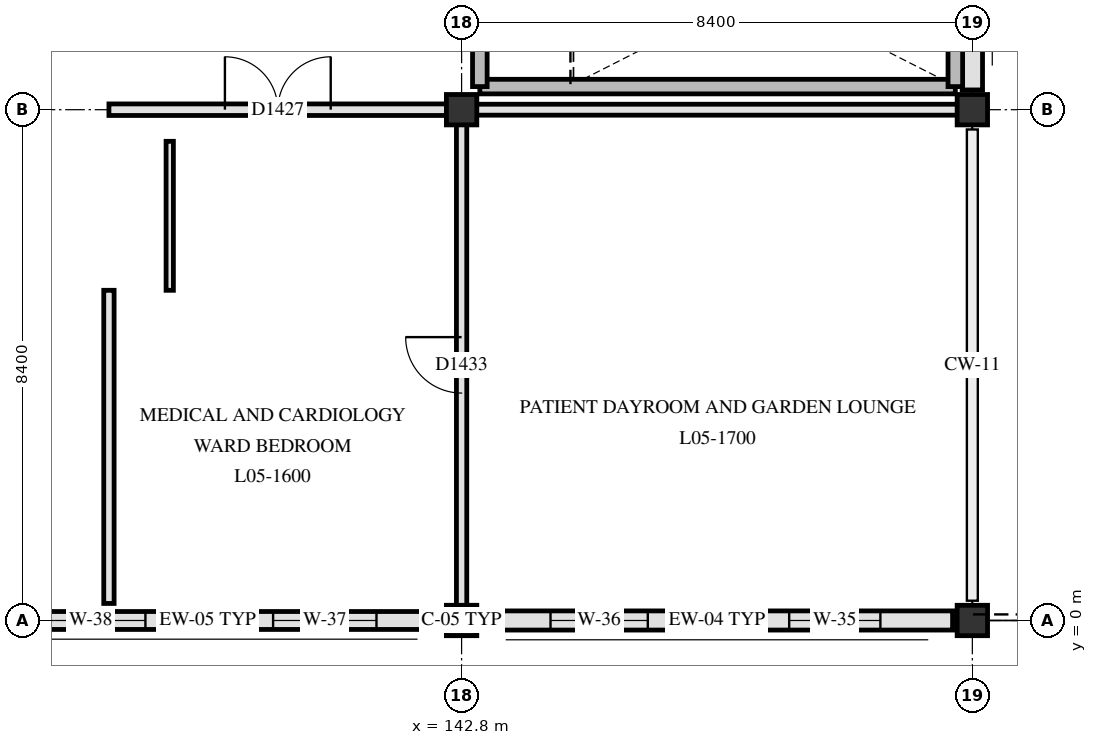
"""IFC4 building model, lengths in metres.
Left out: names, types, materials, properties, quantities, classifications, styles, units other than length and angle.
Written with IfcOpenShell. Run it as: python <this file> out.ifc"""

import sys

from ifc_helpers import new_model, si_unit, direction, frame, frame_2d, origin, origin_2d, place, context, subcontext, project, spatial, rectangle, extrude, element, fill, save


model = new_model("IFC4")
c1 = context("Model", 3, precision=1e-05, world=origin(), true_north=direction((0.0, 1.0)))
c2 = subcontext(c1, "Body", "Model", "MODEL_VIEW")
j1 = project(units=[si_unit("LENGTHUNIT", "METRE"), si_unit("PLANEANGLEUNIT", "RADIAN")], contexts=[c1])
p1 = place(None, origin())
s1 = spatial("IfcSite", under=j1, at=p1, CompositionType="ELEMENT")
p2 = place(p1, origin())
s2 = spatial("IfcBuilding", under=s1, at=p2, CompositionType="ELEMENT")
p3 = place(p2, frame((0.0, 0.0, 22.5)))
s3 = spatial("IfcBuildingStorey", under=s2, at=p3, CompositionType="ELEMENT", Elevation=22.5)
for number, where, z_axis, x_axis in (
    (1, (142.8, 0.0, 0.0), (0.0, 0.0, 1.0), (1.0, 0.0, 0.0)),
    (2, (142.8, 8.4, 0.0), (0.0, 0.0, 1.0), (1.0, 0.0, 0.0)),
    (3, (151.2, 0.0, 0.0), (0.0, 0.0, 1.0), (1.0, 0.0, 0.0)),
    (4, (151.2, 8.4, 0.0), (0.0, 0.0, 1.0), (1.0, 0.0, 0.0)),
):
    element("IfcColumn", number, at=place(p3, frame(where, z_axis=z_axis, x_axis=x_axis)), inside=s3, PredefinedType="COLUMN", context=c2, shape_type="SweptSolid", body=[
        extrude(rectangle(XDim=0.5, YDim=0.5, at=origin_2d()), origin(), (0.0, 0.0, 1.0), 3.9),
    ])
p4 = place(p3, frame((151.2, 16.475, 0.0), z_axis=(0.0, 0.0, 1.0), x_axis=(0.0, -1.0, 0.0)))
e5 = element("IfcWall", 5, at=p4, inside=s3, PredefinedType="SOLIDWALL", context=c2, shape_type="SweptSolid", body=[
    extrude(rectangle(XDim=7.75, YDim=0.335, at=frame_2d((3.875, 0.0))), origin(), (0.0, 0.0, 1.0), 3.37),
])
p5 = place(p4, frame((1.288, 0.0, 0.85)))
e6 = element("IfcOpeningElement", 6, at=p5, cuts=e5, PredefinedType="OPENING", context=c2, shape_type="SweptSolid", body=[
    extrude(rectangle(XDim=1.3, YDim=1.66, at=frame_2d((0.65, 0.83))), frame((0.0, 0.177, 0.0), z_axis=(0.0, -1.0, 0.0), x_axis=(1.0, 0.0, 0.0)), (0.0, 0.0, 1.0), 0.355),
])
p6 = place(p4, frame((5.113, 0.0, 0.85)))
e7 = element("IfcOpeningElement", 7, at=p6, cuts=e5, PredefinedType="OPENING", context=c2, shape_type="SweptSolid", body=[
    extrude(rectangle(XDim=1.4, YDim=1.66, at=frame_2d((0.7, 0.83))), frame((0.0, 0.177, 0.0), z_axis=(0.0, -1.0, 0.0), x_axis=(1.0, 0.0, 0.0)), (0.0, 0.0, 1.0), 0.355),
])
p7 = place(p3, frame((150.875, 0.0, 0.0), z_axis=(0.0, 0.0, 1.0), x_axis=(-1.0, 0.0, 0.0)))
e8 = element("IfcWall", 8, at=p7, inside=s3, PredefinedType="SOLIDWALL", context=c2, shape_type="SweptSolid", body=[
    extrude(rectangle(XDim=7.75, YDim=0.315, at=frame_2d((3.875, 0.0))), origin(), (0.0, 0.0, 1.0), 3.3),
])
p8 = place(p7, frame((1.188, 0.0, 0.85)))
e9 = element("IfcOpeningElement", 9, at=p8, cuts=e8, PredefinedType="OPENING", context=c2, shape_type="SweptSolid", body=[
    extrude(rectangle(XDim=1.5, YDim=1.66, at=frame_2d((0.75, 0.83))), frame((0.0, 0.167, 0.0), z_axis=(0.0, -1.0, 0.0), x_axis=(1.0, 0.0, 0.0)), (0.0, 0.0, 1.0), 0.335),
])
p9 = place(p7, frame((5.012, 0.0, 0.85)))
e10 = element("IfcOpeningElement", 10, at=p9, cuts=e8, PredefinedType="OPENING", context=c2, shape_type="SweptSolid", body=[
    extrude(rectangle(XDim=1.6, YDim=1.66, at=frame_2d((0.8, 0.83))), frame((0.0, 0.167, 0.0), z_axis=(0.0, -1.0, 0.0), x_axis=(1.0, 0.0, 0.0)), (0.0, 0.0, 1.0), 0.335),
])
p10 = place(p3, frame((142.475, 0.0, 0.0), z_axis=(0.0, 0.0, 1.0), x_axis=(-1.0, 0.0, 0.0)))
e11 = element("IfcWall", 11, at=p10, inside=s3, PredefinedType="SOLIDWALL", context=c2, shape_type="SweptSolid", body=[
    extrude(rectangle(XDim=7.7, YDim=0.295, at=frame_2d((3.85, 0.0))), origin(), (0.0, 0.0, 1.0), 3.31),
])
p11 = place(p10, frame((1.075, 0.0, 0.85)))
e12 = element("IfcOpeningElement", 12, at=p11, cuts=e11, PredefinedType="OPENING", context=c2, shape_type="SweptSolid", body=[
    extrude(rectangle(XDim=1.7, YDim=1.66, at=frame_2d((0.85, 0.83))), frame((0.0, 0.157, 0.0), z_axis=(0.0, -1.0, 0.0), x_axis=(1.0, 0.0, 0.0)), (0.0, 0.0, 1.0), 0.315),
])
p12 = place(p10, frame((4.875, 0.0, 0.85)))
e13 = element("IfcOpeningElement", 13, at=p12, cuts=e11, PredefinedType="OPENING", context=c2, shape_type="SweptSolid", body=[
    extrude(rectangle(XDim=1.8, YDim=1.66, at=frame_2d((0.9, 0.83))), frame((0.0, 0.157, 0.0), z_axis=(0.0, -1.0, 0.0), x_axis=(1.0, 0.0, 0.0)), (0.0, 0.0, 1.0), 0.315),
])
p13 = place(p3, frame((143.1, 8.78, 0.0), z_axis=(0.0, 0.0, 1.0), x_axis=(1.0, 0.0, 0.0)))
e14 = element("IfcWall", 14, at=p13, inside=s3, PredefinedType="SHEAR", context=c2, shape_type="SweptSolid", body=[
    extrude(rectangle(XDim=7.82, YDim=0.24, at=frame_2d((3.91, 0.0))), origin(), (0.0, 0.0, 1.0), 3.62),
])
for number, where, z_axis, x_axis in (
    (15, (143.1, 8.78, 0.0), (0.0, 0.0, 1.0), (0.0, 1.0, 0.0)),
    (16, (150.92, 8.78, 0.0), (0.0, 0.0, 1.0), (0.0, 1.0, 0.0)),
):
    element("IfcWall", number, at=place(p3, frame(where, z_axis=z_axis, x_axis=x_axis)), inside=s3, PredefinedType="SHEAR", context=c2, shape_type="SweptSolid", body=[
        extrude(rectangle(XDim=3.32, YDim=0.24, at=frame_2d((1.66, 0.0))), origin(), (0.0, 0.0, 1.0), 3.62),
    ])
p14 = place(p3, frame((137.0, 8.4, 0.0), z_axis=(0.0, 0.0, 1.0), x_axis=(1.0, 0.0, 0.0)))
e17 = element("IfcWall", 17, at=p14, inside=s3, PredefinedType="PARTITIONING", context=c2, shape_type="SweptSolid", body=[
    extrude(rectangle(XDim=5.555, YDim=0.19, at=frame_2d((2.777, 0.0))), origin(), (0.0, 0.0, 1.0), 3.16),
])
p15 = place(p14, frame((1.907, 0.0, 0.0)))
e18 = element("IfcOpeningElement", 18, at=p15, cuts=e17, PredefinedType="OPENING", context=c2, shape_type="SweptSolid", body=[
    extrude(rectangle(XDim=1.74, YDim=2.24, at=frame_2d((0.87, 1.12))), frame((0.0, 0.105, 0.0), z_axis=(0.0, -1.0, 0.0), x_axis=(1.0, 0.0, 0.0)), (0.0, 0.0, 1.0), 0.21),
])
p16 = place(p3, frame((143.045, 8.4, 0.0), z_axis=(0.0, 0.0, 1.0), x_axis=(1.0, 0.0, 0.0)))
e19 = element("IfcWall", 19, at=p16, inside=s3, PredefinedType="PARTITIONING", context=c2, shape_type="SweptSolid", body=[
    extrude(rectangle(XDim=7.91, YDim=0.18, at=frame_2d((3.955, 0.0))), origin(), (0.0, 0.0, 1.0), 3.15),
])
p17 = place(p3, frame((137.0, 0.28, 0.0), z_axis=(0.0, 0.0, 1.0), x_axis=(0.0, 1.0, 0.0)))
e20 = element("IfcWall", 20, at=p17, inside=s3, PredefinedType="PARTITIONING", context=c2, shape_type="SweptSolid", body=[
    extrude(rectangle(XDim=5.15, YDim=0.17, at=frame_2d((2.575, 0.0))), origin(), (0.0, 0.0, 1.0), 3.34),
])
p18 = place(p3, frame((138.0, 5.43, 0.0), z_axis=(0.0, 0.0, 1.0), x_axis=(0.0, 1.0, 0.0)))
e21 = element("IfcWall", 21, at=p18, inside=s3, PredefinedType="PARTITIONING", context=c2, shape_type="SweptSolid", body=[
    extrude(rectangle(XDim=2.45, YDim=0.12, at=frame_2d((1.225, 0.0))), origin(), (0.0, 0.0, 1.0), 3.34),
])
p19 = place(p3, frame((142.8, 0.245, 0.0), z_axis=(0.0, 0.0, 1.0), x_axis=(0.0, 1.0, 0.0)))
e22 = element("IfcWall", 22, at=p19, inside=s3, PredefinedType="PARTITIONING", context=c2, shape_type="SweptSolid", body=[
    extrude(rectangle(XDim=7.91, YDim=0.17, at=frame_2d((3.955, 0.0))), origin(), (0.0, 0.0, 1.0), 3.29),
])
p20 = place(p19, frame((3.495, 0.0, 0.0)))
e23 = element("IfcOpeningElement", 23, at=p20, cuts=e22, PredefinedType="OPENING", context=c2, shape_type="SweptSolid", body=[
    extrude(rectangle(XDim=0.92, YDim=2.08, at=frame_2d((0.46, 1.04))), frame((0.0, 0.095, 0.0), z_axis=(0.0, -1.0, 0.0), x_axis=(1.0, 0.0, 0.0)), (0.0, 0.0, 1.0), 0.19),
])
p21 = place(p8, origin())
e24 = element("IfcWindow", 24, at=p21, inside=s3, PartitioningType="SINGLE_PANEL", PredefinedType="WINDOW", context=c2, shape_type="SweptSolid", body=[
    extrude(rectangle(XDim=1.5, YDim=1.66, at=frame_2d((0.75, 0.83))), frame((0.0, 0.03, 0.0), z_axis=(0.0, -1.0, 0.0), x_axis=(1.0, 0.0, 0.0)), (0.0, 0.0, 1.0), 0.06),
])
fill(e9, e24)
p22 = place(p9, origin())
e25 = element("IfcWindow", 25, at=p22, inside=s3, PartitioningType="SINGLE_PANEL", PredefinedType="WINDOW", context=c2, shape_type="SweptSolid", body=[
    extrude(rectangle(XDim=1.6, YDim=1.66, at=frame_2d((0.8, 0.83))), frame((0.0, 0.03, 0.0), z_axis=(0.0, -1.0, 0.0), x_axis=(1.0, 0.0, 0.0)), (0.0, 0.0, 1.0), 0.06),
])
fill(e10, e25)
p23 = place(p11, origin())
e26 = element("IfcWindow", 26, at=p23, inside=s3, PartitioningType="SINGLE_PANEL", PredefinedType="WINDOW", context=c2, shape_type="SweptSolid", body=[
    extrude(rectangle(XDim=1.7, YDim=1.66, at=frame_2d((0.85, 0.83))), frame((0.0, 0.03, 0.0), z_axis=(0.0, -1.0, 0.0), x_axis=(1.0, 0.0, 0.0)), (0.0, 0.0, 1.0), 0.06),
])
fill(e12, e26)
p24 = place(p12, origin())
e27 = element("IfcWindow", 27, at=p24, inside=s3, PartitioningType="SINGLE_PANEL", PredefinedType="WINDOW", context=c2, shape_type="SweptSolid", body=[
    extrude(rectangle(XDim=1.8, YDim=1.66, at=frame_2d((0.9, 0.83))), frame((0.0, 0.03, 0.0), z_axis=(0.0, -1.0, 0.0), x_axis=(1.0, 0.0, 0.0)), (0.0, 0.0, 1.0), 0.06),
])
fill(e13, e27)
p25 = place(p15, origin())
e28 = element("IfcDoor", 28, at=p25, inside=s3, OperationType="DOUBLE_SWING_RIGHT", PredefinedType="DOOR", context=c2, shape_type="SweptSolid", body=[
    extrude(rectangle(XDim=1.74, YDim=2.24, at=frame_2d((0.87, 1.12))), frame((0.0, 0.025, 0.0), z_axis=(0.0, -1.0, 0.0), x_axis=(1.0, 0.0, 0.0)), (0.0, 0.0, 1.0), 0.05),
])
fill(e18, e28)
p26 = place(p20, origin())
e29 = element("IfcDoor", 29, at=p26, inside=s3, OperationType="SINGLE_SWING_RIGHT", PredefinedType="DOOR", context=c2, shape_type="SweptSolid", body=[
    extrude(rectangle(XDim=0.92, YDim=2.08, at=frame_2d((0.46, 1.04))), frame((0.0, 0.025, 0.0), z_axis=(0.0, -1.0, 0.0), x_axis=(1.0, 0.0, 0.0)), (0.0, 0.0, 1.0), 0.05),
])
fill(e23, e29)
save(model, sys.argv[1])
